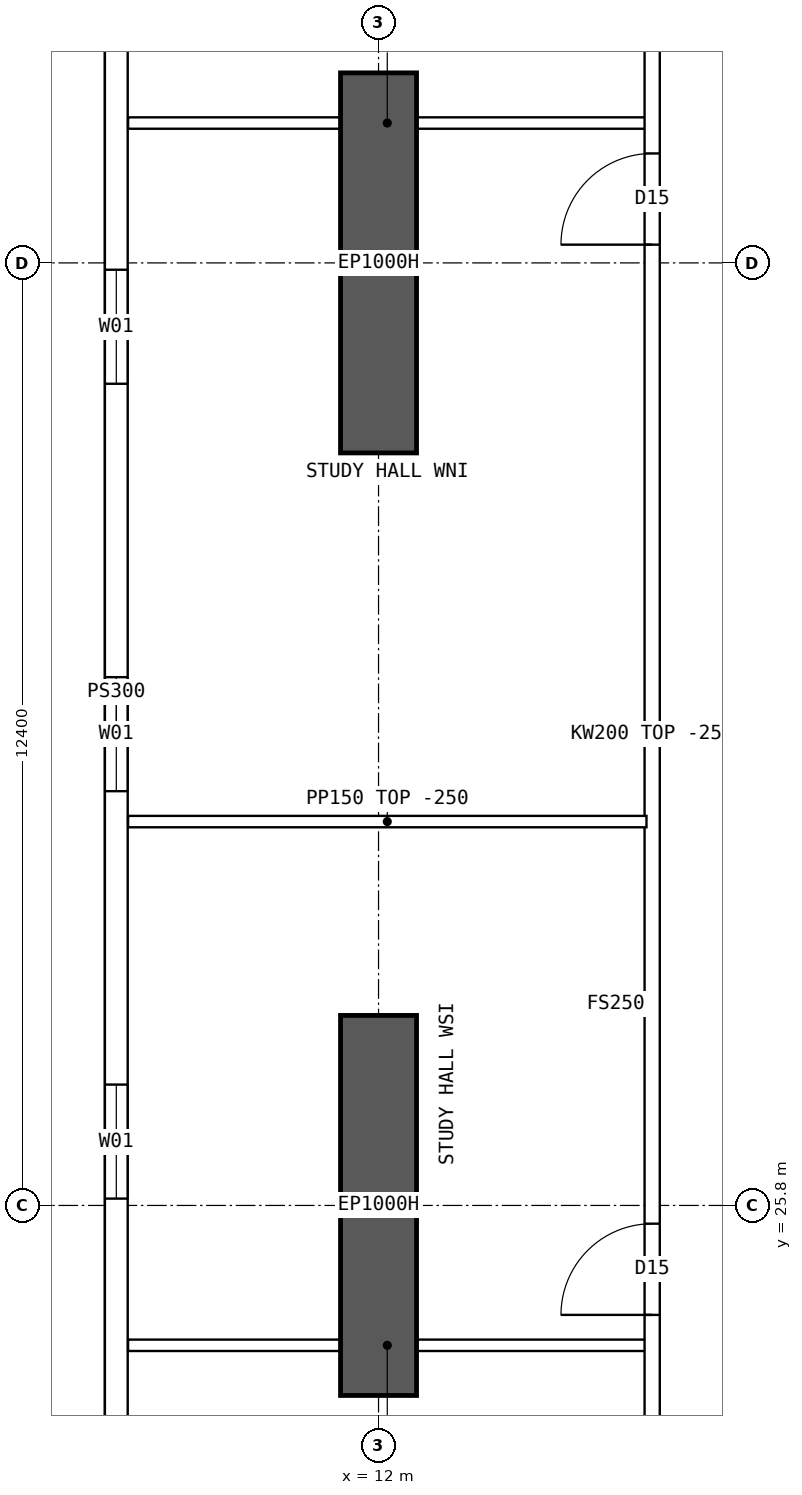
"""IFC4 building model, lengths in metres.
Left out: names, types, materials, properties, quantities, classifications, styles, units other than length and angle.
Written with IfcOpenShell. Run it as: python <this file> out.ifc"""

import sys

from ifc_helpers import new_model, si_unit, direction, frame, frame_2d, origin, place, context, subcontext, project, spatial, polyline, rectangle, outline, extrude, element, fill, save


model = new_model("IFC4")
c1 = context("Model", 3, precision=1e-05, world=origin(), true_north=direction((0.0, 1.0)))
c2 = subcontext(c1, "Body", "Model", "MODEL_VIEW")
j1 = project(units=[si_unit("LENGTHUNIT", "METRE"), si_unit("PLANEANGLEUNIT", "RADIAN")], contexts=[c1])
p1 = place(None, origin())
s1 = spatial("IfcSite", under=j1, at=p1, CompositionType="ELEMENT")
p2 = place(p1, origin())
s2 = spatial("IfcBuilding", under=s1, at=p2, CompositionType="ELEMENT")
p3 = place(p2, frame((0.0, 0.0, 171.1)))
s3 = spatial("IfcBuildingStorey", under=s2, at=p3, CompositionType="ELEMENT", Elevation=171.1)
for number, where, z_axis, x_axis in (
    (1, (12.0, 23.3, 0.0), (0.0, 0.0, 1.0), (0.0, 1.0, 0.0)),
    (2, (12.0, 35.7, 0.0), (0.0, 0.0, 1.0), (0.0, 1.0, 0.0)),
):
    element("IfcWall", number, at=place(p3, frame(where, z_axis=z_axis, x_axis=x_axis)), inside=s3, PredefinedType="SHEAR", context=c2, shape_type="SweptSolid", body=[
        extrude(rectangle(XDim=5.0, YDim=1.0, at=frame_2d((2.5, 0.0))), origin(), (0.0, 0.0, 1.0), 3.75),
    ])
p4 = place(p3, frame((8.55, 45.4, 0.0), z_axis=(0.0, 0.0, 1.0), x_axis=(0.0, -1.0, 0.0)))
e3 = element("IfcWall", 3, at=p4, inside=s3, PredefinedType="SOLIDWALL", context=c2, shape_type="SweptSolid", body=[
    extrude(outline(polyline([(-0.015, -0.15), (26.815, -0.15), (26.785, 0.15), (0.015, 0.15), (-0.015, -0.15)])), origin(), (0.0, 0.0, 1.0), 3.5),
])
p5 = place(p4, frame((1.93, 0.0, 0.9)))
e4 = element("IfcOpeningElement", 4, at=p5, cuts=e3, PredefinedType="OPENING", context=c2, shape_type="SweptSolid", body=[
    extrude(rectangle(XDim=1.5, YDim=2.0, at=frame_2d((0.75, 1.0))), frame((0.0, 0.16, 0.0), z_axis=(0.0, -1.0, 0.0), x_axis=(1.0, 0.0, 0.0)), (0.0, 0.0, 1.0), 0.32),
])
p6 = place(p4, frame((7.29, 0.0, 0.9)))
e5 = element("IfcOpeningElement", 5, at=p6, cuts=e3, PredefinedType="OPENING", context=c2, shape_type="SweptSolid", body=[
    extrude(rectangle(XDim=1.5, YDim=2.0, at=frame_2d((0.75, 1.0))), frame((0.0, 0.16, 0.0), z_axis=(0.0, -1.0, 0.0), x_axis=(1.0, 0.0, 0.0)), (0.0, 0.0, 1.0), 0.32),
])
p7 = place(p4, frame((12.65, 0.0, 0.9)))
e6 = element("IfcOpeningElement", 6, at=p7, cuts=e3, PredefinedType="OPENING", context=c2, shape_type="SweptSolid", body=[
    extrude(rectangle(XDim=1.5, YDim=2.0, at=frame_2d((0.75, 1.0))), frame((0.0, 0.16, 0.0), z_axis=(0.0, -1.0, 0.0), x_axis=(1.0, 0.0, 0.0)), (0.0, 0.0, 1.0), 0.32),
])
p8 = place(p4, frame((18.01, 0.0, 0.9)))
e7 = element("IfcOpeningElement", 7, at=p8, cuts=e3, PredefinedType="OPENING", context=c2, shape_type="SweptSolid", body=[
    extrude(rectangle(XDim=1.5, YDim=2.0, at=frame_2d((0.75, 1.0))), frame((0.0, 0.16, 0.0), z_axis=(0.0, -1.0, 0.0), x_axis=(1.0, 0.0, 0.0)), (0.0, 0.0, 1.0), 0.32),
])
p9 = place(p4, frame((23.37, 0.0, 0.9)))
e8 = element("IfcOpeningElement", 8, at=p9, cuts=e3, PredefinedType="OPENING", context=c2, shape_type="SweptSolid", body=[
    extrude(rectangle(XDim=1.5, YDim=2.0, at=frame_2d((0.75, 1.0))), frame((0.0, 0.16, 0.0), z_axis=(0.0, -1.0, 0.0), x_axis=(1.0, 0.0, 0.0)), (0.0, 0.0, 1.0), 0.32),
])
p10 = place(p3, frame((8.705, 30.85, 0.0), z_axis=(0.0, 0.0, 1.0), x_axis=(1.0, 0.0, 0.0)))
e9 = element("IfcWall", 9, at=p10, inside=s3, PredefinedType="PARTITIONING", context=c2, shape_type="SweptSolid", body=[
    extrude(outline(polyline([(0.0, 0.0), (6.82, 0.0), (6.82, 3.5), (3.597, 3.5), (3.595, 3.05), (2.997, 3.05), (2.995, 3.5), (0.0, 3.5), (0.0, 0.0)])), frame((0.0, 0.075, 0.0), z_axis=(0.0, -1.0, 0.0), x_axis=(1.0, 0.0, 0.0)), (0.0, 0.0, 1.0), 0.15),
])
p11 = place(p3, frame((15.6, 10.446, 0.0), z_axis=(0.0, 0.0, 1.0), x_axis=(0.0, 1.0, 0.0)))
e10 = element("IfcWall", 10, at=p11, inside=s3, PredefinedType="SOLIDWALL", context=c2, shape_type="SweptSolid", body=[
    extrude(rectangle(XDim=43.107, YDim=0.2, at=frame_2d((21.554, 0.0))), origin(), (0.0, 0.0, 1.0), 3.5),
])
p12 = place(p11, frame((13.914, 0.0, 0.0)))
e11 = element("IfcOpeningElement", 11, at=p12, cuts=e10, PredefinedType="OPENING", context=c2, shape_type="SweptSolid", body=[
    extrude(rectangle(XDim=1.2, YDim=2.1, at=frame_2d((0.6, 1.05))), frame((0.0, 0.11, 0.0), z_axis=(0.0, -1.0, 0.0), x_axis=(1.0, 0.0, 0.0)), (0.0, 0.0, 1.0), 0.22),
])
p13 = place(p11, frame((27.994, 0.0, 0.0)))
e12 = element("IfcOpeningElement", 12, at=p13, cuts=e10, PredefinedType="OPENING", context=c2, shape_type="SweptSolid", body=[
    extrude(rectangle(XDim=1.2, YDim=2.1, at=frame_2d((0.6, 1.05))), frame((0.0, 0.11, 0.0), z_axis=(0.0, -1.0, 0.0), x_axis=(1.0, 0.0, 0.0)), (0.0, 0.0, 1.0), 0.22),
])
p14 = place(p11, frame((5.104, 0.0, 0.0)))
e13 = element("IfcOpeningElement", 13, at=p14, cuts=e10, PredefinedType="OPENING", context=c2, shape_type="SweptSolid", body=[
    extrude(rectangle(XDim=1.4, YDim=2.1, at=frame_2d((0.7, 1.05))), frame((0.0, 0.11, 0.0), z_axis=(0.0, -1.0, 0.0), x_axis=(1.0, 0.0, 0.0)), (0.0, 0.0, 1.0), 0.22),
])
p15 = place(p11, frame((36.504, 0.0, 0.0)))
e14 = element("IfcOpeningElement", 14, at=p15, cuts=e10, PredefinedType="OPENING", context=c2, shape_type="SweptSolid", body=[
    extrude(rectangle(XDim=1.4, YDim=2.1, at=frame_2d((0.7, 1.05))), frame((0.0, 0.11, 0.0), z_axis=(0.0, -1.0, 0.0), x_axis=(1.0, 0.0, 0.0)), (0.0, 0.0, 1.0), 0.22),
])
for number, where, z_axis, x_axis in (
    (15, (8.705, 23.96, 0.0), (0.0, 0.0, 1.0), (1.0, 0.0, 0.0)),
    (16, (8.705, 40.04, 0.0), (0.0, 0.0, 1.0), (1.0, 0.0, 0.0)),
):
    element("IfcWall", number, at=place(p3, frame(where, z_axis=z_axis, x_axis=x_axis)), inside=s3, PredefinedType="PARTITIONING", context=c2, shape_type="SweptSolid", body=[
        extrude(rectangle(XDim=6.82, YDim=0.15, at=frame_2d((3.41, 0.0))), origin(), (0.0, 0.0, 1.0), 3.5),
    ])
p16 = place(p6, origin())
e17 = element("IfcWindow", 17, at=p16, inside=s3, PartitioningType="SINGLE_PANEL", PredefinedType="WINDOW", context=c2, shape_type="SweptSolid", body=[
    extrude(rectangle(XDim=1.5, YDim=2.0, at=frame_2d((0.75, 1.0))), frame((0.0, 0.03, 0.0), z_axis=(0.0, -1.0, 0.0), x_axis=(1.0, 0.0, 0.0)), (0.0, 0.0, 1.0), 0.06),
])
fill(e5, e17)
p17 = place(p7, origin())
e18 = element("IfcWindow", 18, at=p17, inside=s3, PartitioningType="SINGLE_PANEL", PredefinedType="WINDOW", context=c2, shape_type="SweptSolid", body=[
    extrude(rectangle(XDim=1.5, YDim=2.0, at=frame_2d((0.75, 1.0))), frame((0.0, 0.03, 0.0), z_axis=(0.0, -1.0, 0.0), x_axis=(1.0, 0.0, 0.0)), (0.0, 0.0, 1.0), 0.06),
])
fill(e6, e18)
p18 = place(p8, origin())
e19 = element("IfcWindow", 19, at=p18, inside=s3, PartitioningType="SINGLE_PANEL", PredefinedType="WINDOW", context=c2, shape_type="SweptSolid", body=[
    extrude(rectangle(XDim=1.5, YDim=2.0, at=frame_2d((0.75, 1.0))), frame((0.0, 0.03, 0.0), z_axis=(0.0, -1.0, 0.0), x_axis=(1.0, 0.0, 0.0)), (0.0, 0.0, 1.0), 0.06),
])
fill(e7, e19)
p19 = place(p12, origin())
e20 = element("IfcDoor", 20, at=p19, inside=s3, OperationType="SINGLE_SWING_LEFT", PredefinedType="DOOR", context=c2, shape_type="SweptSolid", body=[
    extrude(rectangle(XDim=1.2, YDim=2.1, at=frame_2d((0.6, 1.05))), frame((0.0, 0.025, 0.0), z_axis=(0.0, -1.0, 0.0), x_axis=(1.0, 0.0, 0.0)), (0.0, 0.0, 1.0), 0.05),
])
fill(e11, e20)
p20 = place(p13, origin())
e21 = element("IfcDoor", 21, at=p20, inside=s3, OperationType="SINGLE_SWING_LEFT", PredefinedType="DOOR", context=c2, shape_type="SweptSolid", body=[
    extrude(rectangle(XDim=1.2, YDim=2.1, at=frame_2d((0.6, 1.05))), frame((0.0, 0.025, 0.0), z_axis=(0.0, -1.0, 0.0), x_axis=(1.0, 0.0, 0.0)), (0.0, 0.0, 1.0), 0.05),
])
fill(e12, e21)
save(model, sys.argv[1])
